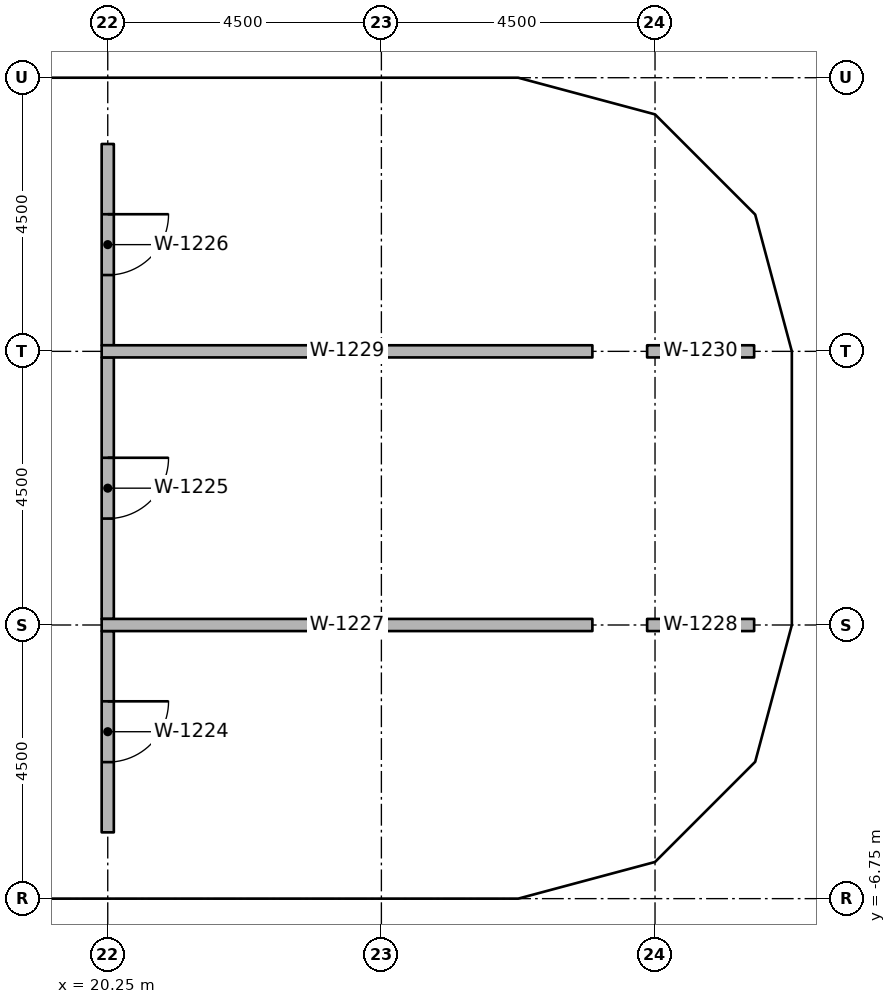
"""IFC4 building model, lengths in metres.
Left out: names, types, materials, properties, quantities, classifications, styles, units other than length and angle.
Written with IfcOpenShell. Run it as: python <this file> out.ifc"""

import sys

from ifc_helpers import new_model, si_unit, direction, frame, frame_2d, origin, origin_2d, place, context, subcontext, project, spatial, rectangle, extrude, element, fill, save


model = new_model("IFC4")
c1 = context("Model", 3, precision=1e-05, world=origin(), true_north=direction((0.0, 1.0)))
c2 = subcontext(c1, "Body", "Model", "MODEL_VIEW")
j1 = project(units=[si_unit("LENGTHUNIT", "METRE"), si_unit("PLANEANGLEUNIT", "RADIAN")], contexts=[c1])
p1 = place(None, origin())
s1 = spatial("IfcSite", under=j1, at=p1, CompositionType="ELEMENT")
p2 = place(p1, origin())
s2 = spatial("IfcBuilding", under=s1, at=p2, CompositionType="ELEMENT")
p3 = place(p2, frame((0.0, 0.0, 128.4)))
s3 = spatial("IfcBuildingStorey", under=s2, at=p3, CompositionType="ELEMENT", Elevation=128.4)
for number, where, z_axis, x_axis in (
    (1, (20.25, -6.11, 0.0), (0.0, 0.0, 1.0), (1.0, 0.0, 0.0)),
    (2, (20.25, 6.11, 0.0), (0.0, 0.0, 1.0), (1.0, 0.0, 0.0)),
    (3, (24.75, -6.11, 0.0), (0.0, 0.0, 1.0), (1.0, 0.0, 0.0)),
    (4, (24.75, 6.11, 0.0), (0.0, 0.0, 1.0), (1.0, 0.0, 0.0)),
    (5, (28.908, -5.475, 0.0), (0.0, 0.0, 1.0), (1.0, 0.0, 0.0)),
    (6, (28.67, -2.25, 0.0), (0.0, 0.0, 1.0), (1.0, 0.0, 0.0)),
    (7, (28.67, 2.25, 0.0), (0.0, 0.0, 1.0), (1.0, 0.0, 0.0)),
    (8, (28.908, 5.475, 0.0), (0.0, 0.0, 1.0), (1.0, 0.0, 0.0)),
):
    element("IfcColumn", number, at=place(p3, frame(where, z_axis=z_axis, x_axis=x_axis)), inside=s3, PredefinedType="COLUMN", context=c2, shape_type="SweptSolid", body=[
        extrude(rectangle(XDim=0.9, YDim=0.9, at=origin_2d()), origin(), (0.0, 0.0, 1.0), 3.65),
    ])
p4 = place(p3, frame((20.25, -2.35, 0.0), z_axis=(0.0, 0.0, 1.0), x_axis=(0.0, -1.0, 0.0)))
e9 = element("IfcWall", 9, at=p4, inside=s3, PredefinedType="PARTITIONING", context=c2, shape_type="SweptSolid", body=[
    extrude(rectangle(XDim=3.31, YDim=0.2, at=frame_2d((1.655, 0.0))), origin(), (0.0, 0.0, 1.0), 2.738),
])
p5 = place(p4, frame((1.155, 0.0, 0.0)))
e10 = element("IfcOpeningElement", 10, at=p5, cuts=e9, PredefinedType="OPENING", context=c2, shape_type="SweptSolid", body=[
    extrude(rectangle(XDim=1.0, YDim=2.1, at=frame_2d((0.5, 1.05))), frame((0.0, 0.11, 0.0), z_axis=(0.0, -1.0, 0.0), x_axis=(1.0, 0.0, 0.0)), (0.0, 0.0, 1.0), 0.22),
])
p6 = place(p3, frame((20.25, 2.15, 0.0), z_axis=(0.0, 0.0, 1.0), x_axis=(0.0, -1.0, 0.0)))
e11 = element("IfcWall", 11, at=p6, inside=s3, PredefinedType="PARTITIONING", context=c2, shape_type="SweptSolid", body=[
    extrude(rectangle(XDim=4.3, YDim=0.2, at=frame_2d((2.15, 0.0))), origin(), (0.0, 0.0, 1.0), 2.738),
])
p7 = place(p6, frame((1.65, 0.0, 0.0)))
e12 = element("IfcOpeningElement", 12, at=p7, cuts=e11, PredefinedType="OPENING", context=c2, shape_type="SweptSolid", body=[
    extrude(rectangle(XDim=1.0, YDim=2.1, at=frame_2d((0.5, 1.05))), frame((0.0, 0.11, 0.0), z_axis=(0.0, -1.0, 0.0), x_axis=(1.0, 0.0, 0.0)), (0.0, 0.0, 1.0), 0.22),
])
p8 = place(p3, frame((20.25, 5.66, 0.0), z_axis=(0.0, 0.0, 1.0), x_axis=(0.0, -1.0, 0.0)))
e13 = element("IfcWall", 13, at=p8, inside=s3, PredefinedType="PARTITIONING", context=c2, shape_type="SweptSolid", body=[
    extrude(rectangle(XDim=3.31, YDim=0.2, at=frame_2d((1.655, 0.0))), origin(), (0.0, 0.0, 1.0), 2.738),
])
p9 = place(p8, frame((1.155, 0.0, 0.0)))
e14 = element("IfcOpeningElement", 14, at=p9, cuts=e13, PredefinedType="OPENING", context=c2, shape_type="SweptSolid", body=[
    extrude(rectangle(XDim=1.0, YDim=2.1, at=frame_2d((0.5, 1.05))), frame((0.0, 0.11, 0.0), z_axis=(0.0, -1.0, 0.0), x_axis=(1.0, 0.0, 0.0)), (0.0, 0.0, 1.0), 0.22),
])
p10 = place(p3, frame((20.15, -2.25, 0.0), z_axis=(0.0, 0.0, 1.0), x_axis=(1.0, 0.0, 0.0)))
e15 = element("IfcWall", 15, at=p10, inside=s3, PredefinedType="PARTITIONING", context=c2, shape_type="SweptSolid", body=[
    extrude(rectangle(XDim=8.07, YDim=0.2, at=frame_2d((4.035, 0.0))), origin(), (0.0, 0.0, 1.0), 2.738),
])
p11 = place(p3, frame((29.12, -2.25, 0.0), z_axis=(0.0, 0.0, 1.0), x_axis=(1.0, 0.0, 0.0)))
e16 = element("IfcWall", 16, at=p11, inside=s3, PredefinedType="PARTITIONING", context=c2, shape_type="SweptSolid", body=[
    extrude(rectangle(XDim=1.76, YDim=0.2, at=frame_2d((0.88, 0.0))), origin(), (0.0, 0.0, 1.0), 2.738),
])
p12 = place(p3, frame((20.15, 2.25, 0.0), z_axis=(0.0, 0.0, 1.0), x_axis=(1.0, 0.0, 0.0)))
e17 = element("IfcWall", 17, at=p12, inside=s3, PredefinedType="PARTITIONING", context=c2, shape_type="SweptSolid", body=[
    extrude(rectangle(XDim=8.07, YDim=0.2, at=frame_2d((4.035, 0.0))), origin(), (0.0, 0.0, 1.0), 2.738),
])
p13 = place(p3, frame((29.12, 2.25, 0.0), z_axis=(0.0, 0.0, 1.0), x_axis=(1.0, 0.0, 0.0)))
e18 = element("IfcWall", 18, at=p13, inside=s3, PredefinedType="PARTITIONING", context=c2, shape_type="SweptSolid", body=[
    extrude(rectangle(XDim=1.76, YDim=0.2, at=frame_2d((0.88, 0.0))), origin(), (0.0, 0.0, 1.0), 2.738),
])
p14 = place(p5, origin())
e19 = element("IfcDoor", 19, at=p14, inside=s3, OperationType="SINGLE_SWING_LEFT", PredefinedType="DOOR", context=c2, shape_type="SweptSolid", body=[
    extrude(rectangle(XDim=1.0, YDim=2.1, at=frame_2d((0.5, 1.05))), frame((0.0, 0.025, 0.0), z_axis=(0.0, -1.0, 0.0), x_axis=(1.0, 0.0, 0.0)), (0.0, 0.0, 1.0), 0.05),
])
fill(e10, e19)
p15 = place(p7, origin())
e20 = element("IfcDoor", 20, at=p15, inside=s3, OperationType="SINGLE_SWING_RIGHT", PredefinedType="DOOR", context=c2, shape_type="SweptSolid", body=[
    extrude(rectangle(XDim=1.0, YDim=2.1, at=frame_2d((0.5, 1.05))), frame((0.0, 0.025, 0.0), z_axis=(0.0, -1.0, 0.0), x_axis=(1.0, 0.0, 0.0)), (0.0, 0.0, 1.0), 0.05),
])
fill(e12, e20)
p16 = place(p9, origin())
e21 = element("IfcDoor", 21, at=p16, inside=s3, OperationType="SINGLE_SWING_RIGHT", PredefinedType="DOOR", context=c2, shape_type="SweptSolid", body=[
    extrude(rectangle(XDim=1.0, YDim=2.1, at=frame_2d((0.5, 1.05))), frame((0.0, 0.025, 0.0), z_axis=(0.0, -1.0, 0.0), x_axis=(1.0, 0.0, 0.0)), (0.0, 0.0, 1.0), 0.05),
])
fill(e14, e21)
save(model, sys.argv[1])
